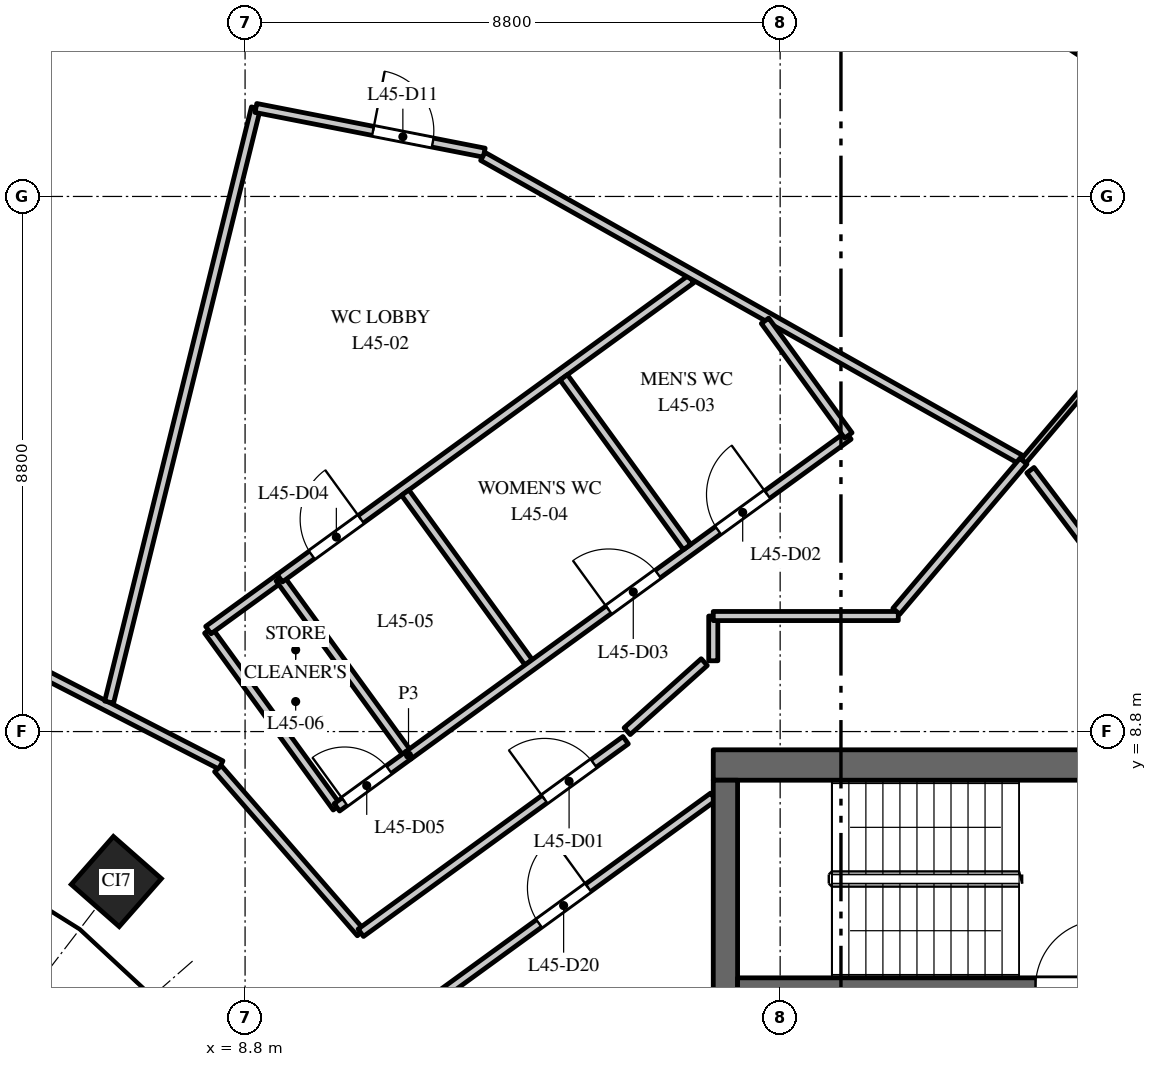
"""IFC4 building model, lengths in metres.
Left out: names, types, materials, properties, quantities, classifications, styles, units other than length and angle.
Written with IfcOpenShell. Run it as: python <this file> out.ifc"""

import sys

from ifc_helpers import new_model, si_unit, direction, frame, frame_2d, origin, origin_2d, place, context, subcontext, project, spatial, rectangle, extrude, element, fill, save


model = new_model("IFC4")
c1 = context("Model", 3, precision=1e-05, world=origin(), true_north=direction((0.0, 1.0)))
c2 = subcontext(c1, "Body", "Model", "MODEL_VIEW")
j1 = project(units=[si_unit("LENGTHUNIT", "METRE"), si_unit("PLANEANGLEUNIT", "RADIAN")], contexts=[c1])
p1 = place(None, origin())
s1 = spatial("IfcSite", under=j1, at=p1, CompositionType="ELEMENT")
p2 = place(p1, origin())
s2 = spatial("IfcBuilding", under=s1, at=p2, CompositionType="ELEMENT")
p3 = place(p2, frame((0.0, 0.0, 194.0)))
s3 = spatial("IfcBuildingStorey", under=s2, at=p3, CompositionType="ELEMENT", Elevation=194.0)
p4 = place(p3, frame((22.362, 20.7, 0.0), z_axis=(0.0, 0.0, 1.0), x_axis=(-0.840247639643, 0.542202825586, 0.0)))
e1 = element("IfcColumn", 1, at=p4, inside=s3, PredefinedType="COLUMN", context=c2, shape_type="SweptSolid", body=[
    extrude(rectangle(XDim=1.15, YDim=1.15, at=origin_2d()), origin(), (0.0, 0.0, 1.0), 4.0),
])
p5 = place(p3, frame((6.682, 6.334, 0.0), z_axis=(0.0, 0.0, 1.0), x_axis=(-0.75102249095, 0.660276622399, 0.0)))
e2 = element("IfcColumn", 2, at=p5, inside=s3, PredefinedType="COLUMN", context=c2, shape_type="SweptSolid", body=[
    extrude(rectangle(XDim=1.05, YDim=1.05, at=origin_2d()), origin(), (0.0, 0.0, 1.0), 4.0),
])
p6 = place(p3, frame((16.5, 8.25, 0.0), z_axis=(0.0, 0.0, 1.0), x_axis=(1.0, 0.0, 0.0)))
e3 = element("IfcWall", 3, at=p6, inside=s3, PredefinedType="SHEAR", context=c2, shape_type="SweptSolid", body=[
    extrude(rectangle(XDim=15.0, YDim=0.5, at=frame_2d((7.5, 0.0))), origin(), (0.0, 0.0, 1.0), 3.7),
])
p7 = place(p6, frame((6.9, 0.0, 0.0)))
e4 = element("IfcOpeningElement", 4, at=p7, cuts=e3, PredefinedType="OPENING", context=c2, shape_type="SweptSolid", body=[
    extrude(rectangle(XDim=1.2, YDim=2.1, at=frame_2d((0.6, 1.05))), frame((0.0, 0.26, 0.0), z_axis=(0.0, -1.0, 0.0), x_axis=(1.0, 0.0, 0.0)), (0.0, 0.0, 1.0), 0.52),
])
p8 = place(p6, frame((12.05, 0.0, 0.0)))
e5 = element("IfcOpeningElement", 5, at=p8, cuts=e3, PredefinedType="OPENING", context=c2, shape_type="SweptSolid", body=[
    extrude(rectangle(XDim=0.9, YDim=2.1, at=frame_2d((0.45, 1.05))), frame((0.0, 0.26, 0.0), z_axis=(0.0, -1.0, 0.0), x_axis=(1.0, 0.0, 0.0)), (0.0, 0.0, 1.0), 0.52),
])
p9 = place(p3, frame((16.7, -8.0, 0.0), z_axis=(0.0, 0.0, 1.0), x_axis=(0.0, 1.0, 0.0)))
e6 = element("IfcWall", 6, at=p9, inside=s3, PredefinedType="SHEAR", context=c2, shape_type="SweptSolid", body=[
    extrude(rectangle(XDim=16.0, YDim=0.4, at=frame_2d((8.0, 0.0))), origin(), (0.0, 0.0, 1.0), 3.7),
])
p10 = place(p3, frame((16.9, 4.6, 0.0), z_axis=(0.0, 0.0, 1.0), x_axis=(1.0, 0.0, 0.0)))
e7 = element("IfcWall", 7, at=p10, inside=s3, PredefinedType="SHEAR", context=c2, shape_type="SweptSolid", body=[
    extrude(rectangle(XDim=6.18, YDim=0.3, at=frame_2d((3.09, 0.0))), origin(), (0.0, 0.0, 1.0), 3.7),
])
p11 = place(p10, frame((4.9, 0.0, 0.0)))
e8 = element("IfcOpeningElement", 8, at=p11, cuts=e7, PredefinedType="OPENING", context=c2, shape_type="SweptSolid", body=[
    extrude(rectangle(XDim=1.1, YDim=2.1, at=frame_2d((0.55, 1.05))), frame((0.0, 0.16, 0.0), z_axis=(0.0, -1.0, 0.0), x_axis=(1.0, 0.0, 0.0)), (0.0, 0.0, 1.0), 0.32),
])
p12 = place(p3, frame((4.459, 10.278, 0.0), z_axis=(0.0, 0.0, 1.0), x_axis=(0.889360097773, -0.457207410799, 0.0)))
e9 = element("IfcWall", 9, at=p12, inside=s3, PredefinedType="PARTITIONING", context=c2, shape_type="SweptSolid", body=[
    extrude(rectangle(XDim=4.434, YDim=0.15, at=frame_2d((2.217, 0.0))), origin(), (0.0, 0.0, 1.0), 2.85),
])
p13 = place(p3, frame((6.564, 9.284, 0.0), z_axis=(0.0, 0.0, 1.0), x_axis=(0.239852170724, 0.970809423213, 0.0)))
e10 = element("IfcWall", 10, at=p13, inside=s3, PredefinedType="PARTITIONING", context=c2, shape_type="SweptSolid", body=[
    extrude(rectangle(XDim=10.065, YDim=0.15, at=frame_2d((5.032, 0.0))), origin(), (0.0, 0.0, 1.0), 2.85),
])
p14 = place(p3, frame((8.195, 10.463, 0.0), z_axis=(0.0, 0.0, 1.0), x_axis=(0.58806271403, -0.80881533391, 0.0)))
e11 = element("IfcWall", 11, at=p14, inside=s3, PredefinedType="PARTITIONING", context=c2, shape_type="SweptSolid", body=[
    extrude(rectangle(XDim=3.596, YDim=0.15, at=frame_2d((1.798, 0.0))), origin(), (0.0, 0.0, 1.0), 3.7),
])
p15 = place(p3, frame((8.196, 10.469, 0.0), z_axis=(0.0, 0.0, 1.0), x_axis=(0.809244737618, 0.587471662838, 0.0)))
e12 = element("IfcWall", 12, at=p15, inside=s3, PredefinedType="PARTITIONING", context=c2, shape_type="SweptSolid", body=[
    extrude(rectangle(XDim=1.452, YDim=0.15, at=frame_2d((0.726, 0.0))), origin(), (0.0, 0.0, 1.0), 3.7),
])
p16 = place(p3, frame((8.355, 8.19, 0.0), z_axis=(0.0, 0.0, 1.0), x_axis=(0.656332459324, -0.754471803871, 0.0)))
e13 = element("IfcWall", 13, at=p16, inside=s3, PredefinedType="PARTITIONING", context=c2, shape_type="SweptSolid", body=[
    extrude(rectangle(XDim=3.577, YDim=0.15, at=frame_2d((1.789, 0.0))), origin(), (0.0, 0.0, 1.0), 2.75),
])
p17 = place(p3, frame((8.978, 19.055, 0.0), z_axis=(0.0, 0.0, 1.0), x_axis=(0.981391609534, -0.192016949083, 0.0)))
e14 = element("IfcWall", 14, at=p17, inside=s3, PredefinedType="PARTITIONING", context=c2, shape_type="SweptSolid", body=[
    extrude(rectangle(XDim=3.827, YDim=0.15, at=frame_2d((1.914, 0.0))), origin(), (0.0, 0.0, 1.0), 2.85),
])
p18 = place(p17, frame((1.963, 0.0, 0.0)))
e15 = element("IfcOpeningElement", 15, at=p18, cuts=e14, PredefinedType="OPENING", context=c2, shape_type="SweptSolid", body=[
    extrude(rectangle(XDim=1.0, YDim=2.1, at=frame_2d((0.5, 1.05))), frame((0.0, 0.085, 0.0), z_axis=(0.0, -1.0, 0.0), x_axis=(1.0, 0.0, 0.0)), (0.0, 0.0, 1.0), 0.17),
])
p19 = place(p3, frame((9.371, 11.322, 0.0), z_axis=(0.0, 0.0, 1.0), x_axis=(0.58812733431, -0.808768346709, 0.0)))
e16 = element("IfcWall", 16, at=p19, inside=s3, PredefinedType="PARTITIONING", context=c2, shape_type="SweptSolid", body=[
    extrude(rectangle(XDim=3.599, YDim=0.15, at=frame_2d((1.8, 0.0))), origin(), (0.0, 0.0, 1.0), 3.7),
])
p20 = place(p3, frame((9.371, 11.322, 0.0), z_axis=(0.0, 0.0, 1.0), x_axis=(0.808791618249, 0.588095330921, 0.0)))
e17 = element("IfcWall", 17, at=p20, inside=s3, PredefinedType="PARTITIONING", context=c2, shape_type="SweptSolid", body=[
    extrude(rectangle(XDim=8.364, YDim=0.15, at=frame_2d((4.182, 0.0))), origin(), (0.0, 0.0, 1.0), 3.7),
])
p21 = place(p20, frame((0.65, 0.0, 0.0)))
e18 = element("IfcOpeningElement", 18, at=p21, cuts=e17, PredefinedType="OPENING", context=c2, shape_type="SweptSolid", body=[
    extrude(rectangle(XDim=1.0, YDim=2.1, at=frame_2d((0.5, 1.05))), frame((0.0, 0.085, 0.0), z_axis=(0.0, -1.0, 0.0), x_axis=(1.0, 0.0, 0.0)), (0.0, 0.0, 1.0), 0.17),
])
p22 = place(p3, frame((10.31, 7.554, 0.0), z_axis=(0.0, 0.0, 1.0), x_axis=(0.808663603061, 0.588271346476, 0.0)))
e19 = element("IfcWall", 19, at=p22, inside=s3, PredefinedType="PARTITIONING", context=c2, shape_type="SweptSolid", body=[
    extrude(rectangle(XDim=1.457, YDim=0.15, at=frame_2d((0.729, 0.0))), origin(), (0.0, 0.0, 1.0), 3.7),
])
p23 = place(p22, frame((0.157, 0.0, 0.0)))
e20 = element("IfcOpeningElement", 20, at=p23, cuts=e19, PredefinedType="OPENING", context=c2, shape_type="SweptSolid", body=[
    extrude(rectangle(XDim=0.9, YDim=2.1, at=frame_2d((0.45, 1.05))), frame((0.0, 0.085, 0.0), z_axis=(0.0, -1.0, 0.0), x_axis=(1.0, 0.0, 0.0)), (0.0, 0.0, 1.0), 0.17),
])
p24 = place(p3, frame((10.703, 5.491, 0.0), z_axis=(0.0, 0.0, 1.0), x_axis=(0.808838005268, 0.588031530816, 0.0)))
e21 = element("IfcWall", 21, at=p24, inside=s3, PredefinedType="PARTITIONING", context=c2, shape_type="SweptSolid", body=[
    extrude(rectangle(XDim=5.386, YDim=0.15, at=frame_2d((2.693, 0.0))), origin(), (0.0, 0.0, 1.0), 2.75),
])
p25 = place(p24, frame((3.736, 0.0, 0.0)))
e22 = element("IfcOpeningElement", 22, at=p25, cuts=e21, PredefinedType="OPENING", context=c2, shape_type="SweptSolid", body=[
    extrude(rectangle(XDim=1.0, YDim=2.1, at=frame_2d((0.5, 1.05))), frame((0.0, 0.085, 0.0), z_axis=(0.0, -1.0, 0.0), x_axis=(1.0, 0.0, 0.0)), (0.0, 0.0, 1.0), 0.17),
])
p26 = place(p3, frame((11.434, 12.729, 0.0), z_axis=(0.0, 0.0, 1.0), x_axis=(0.58811278346, -0.808778927724, 0.0)))
e23 = element("IfcWall", 23, at=p26, inside=s3, PredefinedType="PARTITIONING", context=c2, shape_type="SweptSolid", body=[
    extrude(rectangle(XDim=3.45, YDim=0.15, at=frame_2d((1.725, 0.0))), origin(), (0.0, 0.0, 1.0), 3.7),
])
p27 = place(p3, frame((11.488, 8.411, 0.0), z_axis=(0.0, 0.0, 1.0), x_axis=(0.808982738357, 0.587832398767, 0.0)))
e24 = element("IfcWall", 24, at=p27, inside=s3, PredefinedType="PARTITIONING", context=c2, shape_type="SweptSolid", body=[
    extrude(rectangle(XDim=8.943, YDim=0.15, at=frame_2d((4.472, 0.0))), origin(), (0.0, 0.0, 1.0), 3.7),
])
p28 = place(p27, frame((6.294, 0.0, 0.0)))
e25 = element("IfcOpeningElement", 25, at=p28, cuts=e24, PredefinedType="OPENING", context=c2, shape_type="SweptSolid", body=[
    extrude(rectangle(XDim=1.0, YDim=2.1, at=frame_2d((0.5, 1.05))), frame((0.0, 0.085, 0.0), z_axis=(0.0, -1.0, 0.0), x_axis=(1.0, 0.0, 0.0)), (0.0, 0.0, 1.0), 0.17),
])
p29 = place(p27, frame((4.069, 0.0, 0.0)))
e26 = element("IfcOpeningElement", 26, at=p29, cuts=e24, PredefinedType="OPENING", context=c2, shape_type="SweptSolid", body=[
    extrude(rectangle(XDim=1.0, YDim=2.1, at=frame_2d((0.5, 1.05))), frame((0.0, 0.085, 0.0), z_axis=(0.0, -1.0, 0.0), x_axis=(1.0, 0.0, 0.0)), (0.0, 0.0, 1.0), 0.17),
])
p30 = place(p3, frame((11.556, 4.133, 0.0), z_axis=(0.0, 0.0, 1.0), x_axis=(0.808869060288, 0.587988812231, 0.0)))
e27 = element("IfcWall", 27, at=p30, inside=s3, PredefinedType="PARTITIONING", context=c2, shape_type="SweptSolid", body=[
    extrude(rectangle(XDim=6.112, YDim=0.15, at=frame_2d((3.056, 0.0))), origin(), (0.0, 0.0, 1.0), 3.7),
])
p31 = place(p30, frame((2.57, 0.0, 0.0)))
e28 = element("IfcOpeningElement", 28, at=p31, cuts=e27, PredefinedType="OPENING", context=c2, shape_type="SweptSolid", body=[
    extrude(rectangle(XDim=1.0, YDim=2.1, at=frame_2d((0.5, 1.05))), frame((0.0, 0.085, 0.0), z_axis=(0.0, -1.0, 0.0), x_axis=(1.0, 0.0, 0.0)), (0.0, 0.0, 1.0), 0.17),
])
p32 = place(p3, frame((12.711, 18.258, 0.0), z_axis=(0.0, 0.0, 1.0), x_axis=(0.871190713924, -0.490944742279, 0.0)))
e29 = element("IfcWall", 29, at=p32, inside=s3, PredefinedType="PARTITIONING", context=c2, shape_type="SweptSolid", body=[
    extrude(rectangle(XDim=10.207, YDim=0.15, at=frame_2d((5.104, 0.0))), origin(), (0.0, 0.0, 1.0), 3.7),
])
p33 = place(p3, frame((14.041, 14.625, 0.0), z_axis=(0.0, 0.0, 1.0), x_axis=(0.588159073989, -0.808745265015, 0.0)))
e30 = element("IfcWall", 30, at=p33, inside=s3, PredefinedType="PARTITIONING", context=c2, shape_type="SweptSolid", body=[
    extrude(rectangle(XDim=3.45, YDim=0.15, at=frame_2d((1.725, 0.0))), origin(), (0.0, 0.0, 1.0), 3.7),
])
p34 = place(p3, frame((16.5, 9.964, 0.0), z_axis=(0.0, 0.0, 1.0), x_axis=(0.0, 1.0, 0.0)))
e31 = element("IfcWall", 31, at=p34, inside=s3, PredefinedType="PARTITIONING", context=c2, shape_type="SweptSolid", body=[
    extrude(rectangle(XDim=0.736, YDim=0.15, at=frame_2d((0.368, 0.0))), origin(), (0.0, 0.0, 1.0), 3.7),
])
p35 = place(p3, frame((16.5, 10.7, 0.0), z_axis=(0.0, 0.0, 1.0), x_axis=(1.0, 0.0, 0.0)))
e32 = element("IfcWall", 32, at=p35, inside=s3, PredefinedType="PARTITIONING", context=c2, shape_type="SweptSolid", body=[
    extrude(rectangle(XDim=3.043, YDim=0.15, at=frame_2d((1.521, 0.0))), origin(), (0.0, 0.0, 1.0), 3.7),
])
p36 = place(p3, frame((17.351, 15.555, 0.0), z_axis=(0.0, 0.0, 1.0), x_axis=(0.588153012962, -0.808749672855, 0.0)))
e33 = element("IfcWall", 33, at=p36, inside=s3, PredefinedType="PARTITIONING", context=c2, shape_type="SweptSolid", body=[
    extrude(rectangle(XDim=2.331, YDim=0.15, at=frame_2d((1.166, 0.0))), origin(), (0.0, 0.0, 1.0), 3.7),
])
p37 = place(p3, frame((19.511, 10.778, 0.0), z_axis=(0.0, 0.0, 1.0), x_axis=(0.646314086505, 0.763071491792, 0.0)))
e34 = element("IfcWall", 34, at=p37, inside=s3, PredefinedType="PARTITIONING", context=c2, shape_type="SweptSolid", body=[
    extrude(rectangle(XDim=3.237, YDim=0.15, at=frame_2d((1.618, 0.0))), origin(), (0.0, 0.0, 1.0), 3.7),
])
p38 = place(p3, frame((21.716, 13.098, 0.0), z_axis=(0.0, 0.0, 1.0), x_axis=(0.603132715751, -0.797640851004, 0.0)))
e35 = element("IfcWall", 35, at=p38, inside=s3, PredefinedType="PARTITIONING", context=c2, shape_type="SweptSolid", body=[
    extrude(rectangle(XDim=3.1, YDim=0.15, at=frame_2d((1.55, 0.0))), origin(), (0.0, 0.0, 1.0), 2.75),
])
p39 = place(p3, frame((21.603, 13.248, 0.0), z_axis=(0.0, 0.0, 1.0), x_axis=(0.646437509972, 0.762966936179, 0.0)))
e36 = element("IfcWall", 36, at=p39, inside=s3, PredefinedType="PARTITIONING", context=c2, shape_type="SweptSolid", body=[
    extrude(rectangle(XDim=7.467, YDim=0.1, at=frame_2d((3.733, 0.0))), origin(), (0.0, 0.0, 1.0), 2.9),
])
p40 = place(p3, frame((15.084, 8.806, 0.0), z_axis=(0.0, 0.0, 1.0), x_axis=(0.744832366149, 0.667251636444, 0.0)))
e37 = element("IfcWall", 37, at=p40, inside=s3, PredefinedType="PARTITIONING", context=c2, shape_type="SweptSolid", body=[
    extrude(rectangle(XDim=1.702, YDim=0.15, at=frame_2d((0.851, 0.0))), origin(), (0.0, 0.0, 1.0), 3.7),
])
p41 = place(p11, origin())
e38 = element("IfcDoor", 38, at=p41, inside=s3, OperationType="SINGLE_SWING_LEFT", PredefinedType="DOOR", context=c2, shape_type="SweptSolid", body=[
    extrude(rectangle(XDim=1.1, YDim=2.1, at=frame_2d((0.55, 1.05))), frame((0.0, 0.025, 0.0), z_axis=(0.0, -1.0, 0.0), x_axis=(1.0, 0.0, 0.0)), (0.0, 0.0, 1.0), 0.05),
])
fill(e8, e38)
p42 = place(p25, origin())
e39 = element("IfcDoor", 39, at=p42, inside=s3, OperationType="SINGLE_SWING_LEFT", PredefinedType="DOOR", context=c2, shape_type="SweptSolid", body=[
    extrude(rectangle(XDim=1.0, YDim=2.1, at=frame_2d((0.5, 1.05))), frame((0.0, 0.025, 0.0), z_axis=(0.0, -1.0, 0.0), x_axis=(1.0, 0.0, 0.0)), (0.0, 0.0, 1.0), 0.05),
])
fill(e22, e39)
p43 = place(p28, origin())
e40 = element("IfcDoor", 40, at=p43, inside=s3, OperationType="SINGLE_SWING_RIGHT", PredefinedType="DOOR", context=c2, shape_type="SweptSolid", body=[
    extrude(rectangle(XDim=1.0, YDim=2.1, at=frame_2d((0.5, 1.05))), frame((0.0, 0.025, 0.0), z_axis=(0.0, -1.0, 0.0), x_axis=(1.0, 0.0, 0.0)), (0.0, 0.0, 1.0), 0.05),
])
fill(e25, e40)
p44 = place(p29, origin())
e41 = element("IfcDoor", 41, at=p44, inside=s3, OperationType="SINGLE_SWING_LEFT", PredefinedType="DOOR", context=c2, shape_type="SweptSolid", body=[
    extrude(rectangle(XDim=1.0, YDim=2.1, at=frame_2d((0.5, 1.05))), frame((0.0, 0.025, 0.0), z_axis=(0.0, -1.0, 0.0), x_axis=(1.0, 0.0, 0.0)), (0.0, 0.0, 1.0), 0.05),
])
fill(e26, e41)
p45 = place(p21, origin())
e42 = element("IfcDoor", 42, at=p45, inside=s3, OperationType="SINGLE_SWING_RIGHT", PredefinedType="DOOR", context=c2, shape_type="SweptSolid", body=[
    extrude(rectangle(XDim=1.0, YDim=2.1, at=frame_2d((0.5, 1.05))), frame((0.0, 0.025, 0.0), z_axis=(0.0, -1.0, 0.0), x_axis=(1.0, 0.0, 0.0)), (0.0, 0.0, 1.0), 0.05),
])
fill(e18, e42)
p46 = place(p23, origin())
e43 = element("IfcDoor", 43, at=p46, inside=s3, OperationType="SINGLE_SWING_LEFT", PredefinedType="DOOR", context=c2, shape_type="SweptSolid", body=[
    extrude(rectangle(XDim=0.9, YDim=2.1, at=frame_2d((0.45, 1.05))), frame((0.0, 0.025, 0.0), z_axis=(0.0, -1.0, 0.0), x_axis=(1.0, 0.0, 0.0)), (0.0, 0.0, 1.0), 0.05),
])
fill(e20, e43)
p47 = place(p18, origin())
e44 = element("IfcDoor", 44, at=p47, inside=s3, OperationType="SINGLE_SWING_LEFT", PredefinedType="DOOR", context=c2, shape_type="SweptSolid", body=[
    extrude(rectangle(XDim=1.0, YDim=2.1, at=frame_2d((0.5, 1.05))), frame((0.0, 0.025, 0.0), z_axis=(0.0, -1.0, 0.0), x_axis=(1.0, 0.0, 0.0)), (0.0, 0.0, 1.0), 0.05),
])
fill(e15, e44)
p48 = place(p31, origin())
e45 = element("IfcDoor", 45, at=p48, inside=s3, OperationType="SINGLE_SWING_RIGHT", PredefinedType="DOOR", context=c2, shape_type="SweptSolid", body=[
    extrude(rectangle(XDim=1.0, YDim=2.1, at=frame_2d((0.5, 1.05))), frame((0.0, 0.025, 0.0), z_axis=(0.0, -1.0, 0.0), x_axis=(1.0, 0.0, 0.0)), (0.0, 0.0, 1.0), 0.05),
])
fill(e28, e45)
save(model, sys.argv[1])
